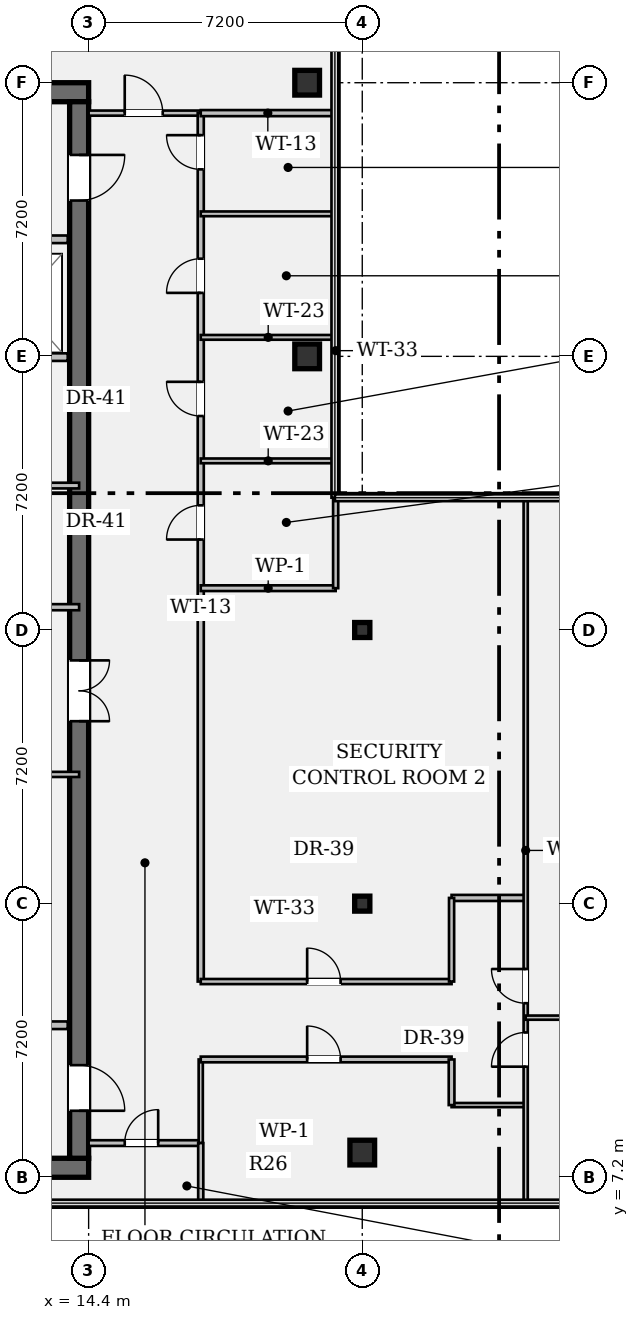
"""IFC4 building model, lengths in metres.
Left out: names, types, materials, properties, quantities, classifications, styles, units other than length and angle.
Written with IfcOpenShell. Run it as: python <this file> out.ifc"""

import sys

from ifc_helpers import new_model, si_unit, direction, frame, frame_2d, origin, origin_2d, place, context, subcontext, project, spatial, rectangle, hollow_rectangle, i_section, extrude, element, fill, save


model = new_model("IFC4")
c1 = context("Model", 3, precision=1e-05, world=origin(), true_north=direction((0.0, 1.0)))
c2 = subcontext(c1, "Body", "Model", "MODEL_VIEW")
j1 = project(units=[si_unit("LENGTHUNIT", "METRE"), si_unit("PLANEANGLEUNIT", "RADIAN")], contexts=[c1])
p1 = place(None, origin())
s1 = spatial("IfcSite", under=j1, at=p1, CompositionType="ELEMENT")
p2 = place(p1, origin())
s2 = spatial("IfcBuilding", under=s1, at=p2, CompositionType="ELEMENT")
p3 = place(p2, frame((0.0, 0.0, 241.15)))
s3 = spatial("IfcBuildingStorey", under=s2, at=p3, CompositionType="ELEMENT", Elevation=241.15)
for number, where, z_axis, x_axis in (
    (1, (0.5, 7.45, 0.0), (0.0, 0.0, 1.0), (1.0, 0.0, 0.0)),
    (2, (0.5, 35.75, 0.0), (0.0, 0.0, 1.0), (1.0, 0.0, 0.0)),
):
    element("IfcWall", number, at=place(p3, frame(where, z_axis=z_axis, x_axis=x_axis)), inside=s3, PredefinedType="SHEAR", context=c2, shape_type="SweptSolid", body=[
        extrude(rectangle(XDim=13.9, YDim=0.5, at=frame_2d((6.95, 0.0))), origin(), (0.0, 0.0, 1.0), 3.24),
    ])
p4 = place(p3, frame((14.15, 35.5, 0.0), z_axis=(0.0, 0.0, 1.0), x_axis=(0.0, -1.0, 0.0)))
e3 = element("IfcWall", 3, at=p4, inside=s3, PredefinedType="SHEAR", context=c2, shape_type="SweptSolid", body=[
    extrude(rectangle(XDim=27.8, YDim=0.5, at=frame_2d((13.9, 0.0))), origin(), (0.0, 0.0, 1.0), 3.24),
])
p5 = place(p4, frame((1.4, 0.0, 0.0)))
e4 = element("IfcOpeningElement", 4, at=p5, cuts=e3, PredefinedType="OPENING", context=c2, shape_type="SweptSolid", body=[
    extrude(rectangle(XDim=1.2, YDim=2.15, at=frame_2d((0.6, 1.075))), frame((0.0, 0.262, 0.0), z_axis=(0.0, -1.0, 0.0), x_axis=(1.0, 0.0, 0.0)), (0.0, 0.0, 1.0), 0.524),
])
p6 = place(p4, frame((25.35, 0.0, 0.0)))
e5 = element("IfcOpeningElement", 5, at=p6, cuts=e3, PredefinedType="OPENING", context=c2, shape_type="SweptSolid", body=[
    extrude(rectangle(XDim=1.2, YDim=2.15, at=frame_2d((0.6, 1.075))), frame((0.0, 0.262, 0.0), z_axis=(0.0, -1.0, 0.0), x_axis=(1.0, 0.0, 0.0)), (0.0, 0.0, 1.0), 0.524),
])
p7 = place(p4, frame((14.7, 0.0, 0.0)))
e6 = element("IfcOpeningElement", 6, at=p7, cuts=e3, PredefinedType="OPENING", context=c2, shape_type="SweptSolid", body=[
    extrude(rectangle(XDim=1.6, YDim=2.2, at=frame_2d((0.8, 1.1))), frame((0.0, 0.262, 0.0), z_axis=(0.0, -1.0, 0.0), x_axis=(1.0, 0.0, 0.0)), (0.0, 0.0, 1.0), 0.524),
])
for number, where, z_axis, x_axis in (
    (7, (20.15, 28.8, 0.0), (0.0, 0.0, 1.0), (1.0, 0.0, 0.0)),
    (8, (20.15, 36.0, 0.0), (0.0, 0.0, 1.0), (1.0, 0.0, 0.0)),
    (9, (21.6, 7.85, 0.0), (0.0, 0.0, 1.0), (1.0, 0.0, 0.0)),
):
    element("IfcColumn", number, at=place(p3, frame(where, z_axis=z_axis, x_axis=x_axis)), inside=s3, PredefinedType="COLUMN", context=c2, shape_type="SweptSolid", body=[
        extrude(hollow_rectangle(XDim=0.65, YDim=0.65, WallThickness=0.04, at=origin_2d()), origin(), (0.0, 0.0, 1.0), 3.24),
    ])
for number, where, z_axis, x_axis in (
    (10, (21.6, 14.4, 0.0), (0.0, 0.0, 1.0), (1.0, 0.0, 0.0)),
    (11, (21.6, 21.6, 0.0), (0.0, 0.0, 1.0), (1.0, 0.0, 0.0)),
):
    element("IfcColumn", number, at=place(p3, frame(where, z_axis=z_axis, x_axis=x_axis)), inside=s3, PredefinedType="COLUMN", context=c2, shape_type="SweptSolid", body=[
        extrude(i_section(OverallWidth=0.399, OverallDepth=0.394, WebThickness=0.023, FlangeThickness=0.037, FilletRadius=0.018, at=origin_2d()), origin(), (0.0, 0.0, 1.0), 3.24),
    ])
p8 = place(p3, frame((8.7, 31.88, 0.0), z_axis=(0.0, 0.0, 1.0), x_axis=(1.0, 0.0, 0.0)))
e12 = element("IfcWall", 12, at=p8, inside=s3, PredefinedType="PARTITIONING", context=c2, shape_type="SweptSolid", body=[
    extrude(rectangle(XDim=5.15, YDim=0.2, at=frame_2d((2.575, 0.0))), origin(), (0.0, 0.0, 1.0), 3.24),
])
p9 = place(p8, frame((0.75, 0.0, 0.0)))
e13 = element("IfcOpeningElement", 13, at=p9, cuts=e12, PredefinedType="OPENING", context=c2, shape_type="SweptSolid", body=[
    extrude(rectangle(XDim=1.2, YDim=2.2, at=frame_2d((0.6, 1.1))), frame((0.0, 0.112, 0.0), z_axis=(0.0, -1.0, 0.0), x_axis=(1.0, 0.0, 0.0)), (0.0, 0.0, 1.0), 0.224),
])
p10 = place(p8, frame((3.25, 0.0, 0.0)))
e14 = element("IfcOpeningElement", 14, at=p10, cuts=e12, PredefinedType="OPENING", context=c2, shape_type="SweptSolid", body=[
    extrude(rectangle(XDim=1.2, YDim=2.2, at=frame_2d((0.6, 1.1))), frame((0.0, 0.112, 0.0), z_axis=(0.0, -1.0, 0.0), x_axis=(1.0, 0.0, 0.0)), (0.0, 0.0, 1.0), 0.224),
])
for number, where, z_axis, x_axis in (
    (15, (8.7, 11.2, 0.0), (0.0, 0.0, 1.0), (1.0, 0.0, 0.0)),
    (16, (8.7, 28.78, 0.0), (0.0, 0.0, 1.0), (1.0, 0.0, 0.0)),
):
    element("IfcWall", number, at=place(p3, frame(where, z_axis=z_axis, x_axis=x_axis)), inside=s3, PredefinedType="PARTITIONING", context=c2, shape_type="SweptSolid", body=[
        extrude(rectangle(XDim=5.15, YDim=0.2, at=frame_2d((2.575, 0.0))), origin(), (0.0, 0.0, 1.0), 3.24),
    ])
p11 = place(p3, frame((7.1, 22.2, 0.0), z_axis=(0.0, 0.0, 1.0), x_axis=(1.0, 0.0, 0.0)))
e17 = element("IfcWall", 17, at=p11, inside=s3, PredefinedType="PARTITIONING", context=c2, shape_type="SweptSolid", body=[
    extrude(rectangle(XDim=7.05, YDim=0.16, at=frame_2d((3.525, 0.0))), origin(), (0.0, 0.0, 1.0), 3.24),
])
p12 = place(p3, frame((7.1, 25.4, 0.0), z_axis=(0.0, 0.0, 1.0), x_axis=(1.0, 0.0, 0.0)))
e18 = element("IfcWall", 18, at=p12, inside=s3, PredefinedType="PARTITIONING", context=c2, shape_type="SweptSolid", body=[
    extrude(rectangle(XDim=7.05, YDim=0.15, at=frame_2d((3.525, 0.0))), origin(), (0.0, 0.0, 1.0), 3.24),
])
p13 = place(p3, frame((5.15, 17.8, 0.0), z_axis=(0.0, 0.0, 1.0), x_axis=(1.0, 0.0, 0.0)))
e19 = element("IfcWall", 19, at=p13, inside=s3, PredefinedType="PARTITIONING", context=c2, shape_type="SweptSolid", body=[
    extrude(rectangle(XDim=9.0, YDim=0.135, at=frame_2d((4.5, 0.0))), origin(), (0.0, 0.0, 1.0), 3.24),
])
p14 = place(p13, frame((4.35, 0.0, 0.0)))
e20 = element("IfcOpeningElement", 20, at=p14, cuts=e19, PredefinedType="OPENING", context=c2, shape_type="SweptSolid", body=[
    extrude(rectangle(XDim=1.0, YDim=2.15, at=frame_2d((0.5, 1.075))), frame((0.0, 0.08, 0.0), z_axis=(0.0, -1.0, 0.0), x_axis=(1.0, 0.0, 0.0)), (0.0, 0.0, 1.0), 0.159),
])
p15 = place(p3, frame((14.4, 8.1, 0.0), z_axis=(0.0, 0.0, 1.0), x_axis=(1.0, 0.0, 0.0)))
e21 = element("IfcWall", 21, at=p15, inside=s3, PredefinedType="PARTITIONING", context=c2, shape_type="SweptSolid", body=[
    extrude(rectangle(XDim=2.95, YDim=0.15, at=frame_2d((1.475, 0.0))), origin(), (0.0, 0.0, 1.0), 3.24),
])
p16 = place(p15, frame((0.95, 0.0, 0.0)))
e22 = element("IfcOpeningElement", 22, at=p16, cuts=e21, PredefinedType="OPENING", context=c2, shape_type="SweptSolid", body=[
    extrude(rectangle(XDim=0.88, YDim=2.15, at=frame_2d((0.44, 1.075))), frame((0.0, 0.087, 0.0), z_axis=(0.0, -1.0, 0.0), x_axis=(1.0, 0.0, 0.0)), (0.0, 0.0, 1.0), 0.174),
])
p17 = place(p3, frame((14.4, 35.2, 0.0), z_axis=(0.0, 0.0, 1.0), x_axis=(1.0, 0.0, 0.0)))
e23 = element("IfcWall", 23, at=p17, inside=s3, PredefinedType="PARTITIONING", context=c2, shape_type="SweptSolid", body=[
    extrude(rectangle(XDim=2.95, YDim=0.135, at=frame_2d((1.475, 0.0))), origin(), (0.0, 0.0, 1.0), 2.808),
])
p18 = place(p17, frame((0.95, 0.0, 0.0)))
e24 = element("IfcOpeningElement", 24, at=p18, cuts=e23, PredefinedType="OPENING", context=c2, shape_type="SweptSolid", body=[
    extrude(rectangle(XDim=1.0, YDim=2.15, at=frame_2d((0.5, 1.075))), frame((0.0, 0.08, 0.0), z_axis=(0.0, -1.0, 0.0), x_axis=(1.0, 0.0, 0.0)), (0.0, 0.0, 1.0), 0.159),
])
p19 = place(p3, frame((17.35, 8.1, 0.0), z_axis=(0.0, 0.0, 1.0), x_axis=(0.0, 1.0, 0.0)))
e25 = element("IfcWall", 25, at=p19, inside=s3, PredefinedType="PARTITIONING", context=c2, shape_type="SweptSolid", body=[
    extrude(rectangle(XDim=2.2, YDim=0.11, at=frame_2d((1.1, 0.0))), origin(), (0.0, 0.0, 1.0), 3.24),
])
p20 = place(p3, frame((17.35, 12.35, 0.0), z_axis=(0.0, 0.0, 1.0), x_axis=(0.0, 1.0, 0.0)))
e26 = element("IfcWall", 26, at=p20, inside=s3, PredefinedType="PARTITIONING", context=c2, shape_type="SweptSolid", body=[
    extrude(rectangle(XDim=22.85, YDim=0.16, at=frame_2d((11.425, 0.0))), origin(), (0.0, 0.0, 1.0), 2.676),
])
p21 = place(p20, frame((11.63, 0.0, 0.0)))
e27 = element("IfcOpeningElement", 27, at=p21, cuts=e26, PredefinedType="OPENING", context=c2, shape_type="SweptSolid", body=[
    extrude(rectangle(XDim=0.9, YDim=2.15, at=frame_2d((0.45, 1.075))), frame((0.0, 0.092, 0.0), z_axis=(0.0, -1.0, 0.0), x_axis=(1.0, 0.0, 0.0)), (0.0, 0.0, 1.0), 0.184),
])
p22 = place(p20, frame((14.88, 0.0, 0.0)))
e28 = element("IfcOpeningElement", 28, at=p22, cuts=e26, PredefinedType="OPENING", context=c2, shape_type="SweptSolid", body=[
    extrude(rectangle(XDim=0.9, YDim=2.15, at=frame_2d((0.45, 1.075))), frame((0.0, 0.092, 0.0), z_axis=(0.0, -1.0, 0.0), x_axis=(1.0, 0.0, 0.0)), (0.0, 0.0, 1.0), 0.184),
])
p23 = place(p20, frame((18.12, 0.0, 0.0)))
e29 = element("IfcOpeningElement", 29, at=p23, cuts=e26, PredefinedType="OPENING", context=c2, shape_type="SweptSolid", body=[
    extrude(rectangle(XDim=0.9, YDim=2.15, at=frame_2d((0.45, 1.075))), frame((0.0, 0.092, 0.0), z_axis=(0.0, -1.0, 0.0), x_axis=(1.0, 0.0, 0.0)), (0.0, 0.0, 1.0), 0.184),
])
p24 = place(p20, frame((21.37, 0.0, 0.0)))
e30 = element("IfcOpeningElement", 30, at=p24, cuts=e26, PredefinedType="OPENING", context=c2, shape_type="SweptSolid", body=[
    extrude(rectangle(XDim=0.9, YDim=2.15, at=frame_2d((0.45, 1.075))), frame((0.0, 0.092, 0.0), z_axis=(0.0, -1.0, 0.0), x_axis=(1.0, 0.0, 0.0)), (0.0, 0.0, 1.0), 0.184),
])
p25 = place(p3, frame((17.35, 10.3, 0.0), z_axis=(0.0, 0.0, 1.0), x_axis=(1.0, 0.0, 0.0)))
e31 = element("IfcWall", 31, at=p25, inside=s3, PredefinedType="PARTITIONING", context=c2, shape_type="SweptSolid", body=[
    extrude(rectangle(XDim=6.6, YDim=0.15, at=frame_2d((3.3, 0.0))), origin(), (0.0, 0.0, 1.0), 2.676),
])
p26 = place(p25, frame((2.8, 0.0, 0.0)))
e32 = element("IfcOpeningElement", 32, at=p26, cuts=e31, PredefinedType="OPENING", context=c2, shape_type="SweptSolid", body=[
    extrude(rectangle(XDim=0.88, YDim=2.15, at=frame_2d((0.44, 1.075))), frame((0.0, 0.087, 0.0), z_axis=(0.0, -1.0, 0.0), x_axis=(1.0, 0.0, 0.0)), (0.0, 0.0, 1.0), 0.174),
])
p27 = place(p3, frame((17.35, 12.35, 0.0), z_axis=(0.0, 0.0, 1.0), x_axis=(1.0, 0.0, 0.0)))
e33 = element("IfcWall", 33, at=p27, inside=s3, PredefinedType="PARTITIONING", context=c2, shape_type="SweptSolid", body=[
    extrude(rectangle(XDim=6.6, YDim=0.135, at=frame_2d((3.3, 0.0))), origin(), (0.0, 0.0, 1.0), 2.676),
])
p28 = place(p27, frame((2.8, 0.0, 0.0)))
e34 = element("IfcOpeningElement", 34, at=p28, cuts=e33, PredefinedType="OPENING", context=c2, shape_type="SweptSolid", body=[
    extrude(rectangle(XDim=0.88, YDim=2.15, at=frame_2d((0.44, 1.075))), frame((0.0, 0.08, 0.0), z_axis=(0.0, -1.0, 0.0), x_axis=(1.0, 0.0, 0.0)), (0.0, 0.0, 1.0), 0.159),
])
p29 = place(p3, frame((23.95, 9.1, 0.0), z_axis=(0.0, 0.0, 1.0), x_axis=(1.0, 0.0, 0.0)))
e35 = element("IfcWall", 35, at=p29, inside=s3, PredefinedType="PARTITIONING", context=c2, shape_type="SweptSolid", body=[
    extrude(rectangle(XDim=1.95, YDim=0.11, at=frame_2d((0.975, 0.0))), origin(), (0.0, 0.0, 1.0), 3.24),
])
p30 = place(p3, frame((23.95, 14.55, 0.0), z_axis=(0.0, 0.0, 1.0), x_axis=(1.0, 0.0, 0.0)))
e36 = element("IfcWall", 36, at=p30, inside=s3, PredefinedType="PARTITIONING", context=c2, shape_type="SweptSolid", body=[
    extrude(rectangle(XDim=1.95, YDim=0.16, at=frame_2d((0.975, 0.0))), origin(), (0.0, 0.0, 1.0), 2.676),
])
p31 = place(p3, frame((23.95, 9.1, 0.0), z_axis=(0.0, 0.0, 1.0), x_axis=(0.0, 1.0, 0.0)))
e37 = element("IfcWall", 37, at=p31, inside=s3, PredefinedType="PARTITIONING", context=c2, shape_type="SweptSolid", body=[
    extrude(rectangle(XDim=1.2, YDim=0.15, at=frame_2d((0.6, 0.0))), origin(), (0.0, 0.0, 1.0), 2.808),
])
p32 = place(p3, frame((23.95, 12.35, 0.0), z_axis=(0.0, 0.0, 1.0), x_axis=(0.0, 1.0, 0.0)))
e38 = element("IfcWall", 38, at=p32, inside=s3, PredefinedType="PARTITIONING", context=c2, shape_type="SweptSolid", body=[
    extrude(rectangle(XDim=2.2, YDim=0.135, at=frame_2d((1.1, 0.0))), origin(), (0.0, 0.0, 1.0), 2.676),
])
p33 = place(p3, frame((25.9, 6.52, 0.0), z_axis=(0.0, 0.0, 1.0), x_axis=(0.0, 1.0, 0.0)))
e39 = element("IfcWall", 39, at=p33, inside=s3, PredefinedType="PARTITIONING", context=c2, shape_type="SweptSolid", body=[
    extrude(rectangle(XDim=18.56, YDim=0.11, at=frame_2d((9.28, 0.0))), origin(), (0.0, 0.0, 1.0), 2.676),
])
p34 = place(p33, frame((3.59, 0.0, 0.0)))
e40 = element("IfcOpeningElement", 40, at=p34, cuts=e39, PredefinedType="OPENING", context=c2, shape_type="SweptSolid", body=[
    extrude(rectangle(XDim=0.9, YDim=2.15, at=frame_2d((0.45, 1.075))), frame((0.0, 0.067, 0.0), z_axis=(0.0, -1.0, 0.0), x_axis=(1.0, 0.0, 0.0)), (0.0, 0.0, 1.0), 0.134),
])
p35 = place(p33, frame((5.26, 0.0, 0.0)))
e41 = element("IfcOpeningElement", 41, at=p35, cuts=e39, PredefinedType="OPENING", context=c2, shape_type="SweptSolid", body=[
    extrude(rectangle(XDim=0.9, YDim=2.15, at=frame_2d((0.45, 1.075))), frame((0.0, 0.067, 0.0), z_axis=(0.0, -1.0, 0.0), x_axis=(1.0, 0.0, 0.0)), (0.0, 0.0, 1.0), 0.134),
])
p36 = place(p3, frame((17.35, 35.2, 0.0), z_axis=(0.0, 0.0, 1.0), x_axis=(1.0, 0.0, 0.0)))
e42 = element("IfcWall", 42, at=p36, inside=s3, PredefinedType="PARTITIONING", context=c2, shape_type="SweptSolid", body=[
    extrude(rectangle(XDim=3.53, YDim=0.16, at=frame_2d((1.765, 0.0))), origin(), (0.0, 0.0, 1.0), 2.808),
])
p37 = place(p3, frame((17.35, 22.7, 0.0), z_axis=(0.0, 0.0, 1.0), x_axis=(1.0, 0.0, 0.0)))
e43 = element("IfcWall", 43, at=p37, inside=s3, PredefinedType="PARTITIONING", context=c2, shape_type="SweptSolid", body=[
    extrude(rectangle(XDim=3.55, YDim=0.15, at=frame_2d((1.775, 0.0))), origin(), (0.0, 0.0, 1.0), 2.808),
])
p38 = place(p3, frame((20.9, 22.7, 0.0), z_axis=(0.0, 0.0, 1.0), x_axis=(0.0, 1.0, 0.0)))
e44 = element("IfcWall", 44, at=p38, inside=s3, PredefinedType="PARTITIONING", context=c2, shape_type="SweptSolid", body=[
    extrude(rectangle(XDim=12.5, YDim=0.135, at=frame_2d((6.25, 0.0))), origin(), (0.0, 0.0, 1.0), 3.24),
])
for number, where, z_axis, x_axis in (
    (45, (17.35, 26.05, 0.0), (0.0, 0.0, 1.0), (1.0, 0.0, 0.0)),
    (46, (17.35, 29.3, 0.0), (0.0, 0.0, 1.0), (1.0, 0.0, 0.0)),
    (47, (17.35, 32.55, 0.0), (0.0, 0.0, 1.0), (1.0, 0.0, 0.0)),
):
    element("IfcWall", number, at=place(p3, frame(where, z_axis=z_axis, x_axis=x_axis)), inside=s3, PredefinedType="PARTITIONING", context=c2, shape_type="SweptSolid", body=[
        extrude(rectangle(XDim=3.55, YDim=0.125, at=frame_2d((1.775, 0.0))), origin(), (0.0, 0.0, 1.0), 2.808),
    ])
p39 = place(p3, frame((17.35, 6.52, 0.0), z_axis=(0.0, 0.0, 1.0), x_axis=(0.0, 1.0, 0.0)))
e48 = element("IfcWall", 48, at=p39, inside=s3, PredefinedType="PARTITIONING", context=c2, shape_type="SweptSolid", body=[
    extrude(rectangle(XDim=1.58, YDim=0.135, at=frame_2d((0.79, 0.0))), origin(), (0.0, 0.0, 1.0), 3.24),
])
p40 = place(p3, frame((25.9, 11.4, 0.0), z_axis=(0.0, 0.0, 1.0), x_axis=(1.0, 0.0, 0.0)))
e49 = element("IfcWall", 49, at=p40, inside=s3, PredefinedType="PARTITIONING", context=c2, shape_type="SweptSolid", body=[
    extrude(rectangle(XDim=19.58, YDim=0.11, at=frame_2d((9.79, 0.0))), origin(), (0.0, 0.0, 1.0), 2.676),
])
p41 = place(p5, origin())
e50 = element("IfcDoor", 50, at=p41, inside=s3, OperationType="SINGLE_SWING_LEFT", PredefinedType="DOOR", context=c2, shape_type="SweptSolid", body=[
    extrude(rectangle(XDim=1.2, YDim=2.15, at=frame_2d((0.6, 1.075))), frame((0.0, 0.025, 0.0), z_axis=(0.0, -1.0, 0.0), x_axis=(1.0, 0.0, 0.0)), (0.0, 0.0, 1.0), 0.05),
])
fill(e4, e50)
p42 = place(p6, origin())
e51 = element("IfcDoor", 51, at=p42, inside=s3, OperationType="SINGLE_SWING_RIGHT", PredefinedType="DOOR", context=c2, shape_type="SweptSolid", body=[
    extrude(rectangle(XDim=1.2, YDim=2.15, at=frame_2d((0.6, 1.075))), frame((0.0, 0.025, 0.0), z_axis=(0.0, -1.0, 0.0), x_axis=(1.0, 0.0, 0.0)), (0.0, 0.0, 1.0), 0.05),
])
fill(e5, e51)
p43 = place(p7, origin())
e52 = element("IfcDoor", 52, at=p43, inside=s3, OperationType="DOUBLE_DOOR_SINGLE_SWING", PredefinedType="DOOR", context=c2, shape_type="SweptSolid", body=[
    extrude(rectangle(XDim=1.6, YDim=2.2, at=frame_2d((0.8, 1.1))), frame((0.0, 0.025, 0.0), z_axis=(0.0, -1.0, 0.0), x_axis=(1.0, 0.0, 0.0)), (0.0, 0.0, 1.0), 0.05),
])
fill(e6, e52)
p44 = place(p18, origin())
e53 = element("IfcDoor", 53, at=p44, inside=s3, OperationType="SINGLE_SWING_LEFT", PredefinedType="DOOR", context=c2, shape_type="SweptSolid", body=[
    extrude(rectangle(XDim=1.0, YDim=2.15, at=frame_2d((0.5, 1.075))), frame((0.0, 0.025, 0.0), z_axis=(0.0, -1.0, 0.0), x_axis=(1.0, 0.0, 0.0)), (0.0, 0.0, 1.0), 0.05),
])
fill(e24, e53)
p45 = place(p21, origin())
e54 = element("IfcDoor", 54, at=p45, inside=s3, OperationType="SINGLE_SWING_LEFT", PredefinedType="DOOR", context=c2, shape_type="SweptSolid", body=[
    extrude(rectangle(XDim=0.9, YDim=2.15, at=frame_2d((0.45, 1.075))), frame((0.0, 0.025, 0.0), z_axis=(0.0, -1.0, 0.0), x_axis=(1.0, 0.0, 0.0)), (0.0, 0.0, 1.0), 0.05),
])
fill(e27, e54)
p46 = place(p22, origin())
e55 = element("IfcDoor", 55, at=p46, inside=s3, OperationType="SINGLE_SWING_RIGHT", PredefinedType="DOOR", context=c2, shape_type="SweptSolid", body=[
    extrude(rectangle(XDim=0.9, YDim=2.15, at=frame_2d((0.45, 1.075))), frame((0.0, 0.025, 0.0), z_axis=(0.0, -1.0, 0.0), x_axis=(1.0, 0.0, 0.0)), (0.0, 0.0, 1.0), 0.05),
])
fill(e28, e55)
p47 = place(p23, origin())
e56 = element("IfcDoor", 56, at=p47, inside=s3, OperationType="SINGLE_SWING_LEFT", PredefinedType="DOOR", context=c2, shape_type="SweptSolid", body=[
    extrude(rectangle(XDim=0.9, YDim=2.15, at=frame_2d((0.45, 1.075))), frame((0.0, 0.025, 0.0), z_axis=(0.0, -1.0, 0.0), x_axis=(1.0, 0.0, 0.0)), (0.0, 0.0, 1.0), 0.05),
])
fill(e29, e56)
p48 = place(p24, origin())
e57 = element("IfcDoor", 57, at=p48, inside=s3, OperationType="SINGLE_SWING_RIGHT", PredefinedType="DOOR", context=c2, shape_type="SweptSolid", body=[
    extrude(rectangle(XDim=0.9, YDim=2.15, at=frame_2d((0.45, 1.075))), frame((0.0, 0.025, 0.0), z_axis=(0.0, -1.0, 0.0), x_axis=(1.0, 0.0, 0.0)), (0.0, 0.0, 1.0), 0.05),
])
fill(e30, e57)
p49 = place(p28, origin())
e58 = element("IfcDoor", 58, at=p49, inside=s3, OperationType="SINGLE_SWING_LEFT", PredefinedType="DOOR", context=c2, shape_type="SweptSolid", body=[
    extrude(rectangle(XDim=0.88, YDim=2.15, at=frame_2d((0.44, 1.075))), frame((0.0, 0.025, 0.0), z_axis=(0.0, -1.0, 0.0), x_axis=(1.0, 0.0, 0.0)), (0.0, 0.0, 1.0), 0.05),
])
fill(e34, e58)
p50 = place(p16, origin())
e59 = element("IfcDoor", 59, at=p50, inside=s3, OperationType="SINGLE_SWING_RIGHT", PredefinedType="DOOR", context=c2, shape_type="SweptSolid", body=[
    extrude(rectangle(XDim=0.88, YDim=2.15, at=frame_2d((0.44, 1.075))), frame((0.0, 0.025, 0.0), z_axis=(0.0, -1.0, 0.0), x_axis=(1.0, 0.0, 0.0)), (0.0, 0.0, 1.0), 0.05),
])
fill(e22, e59)
p51 = place(p26, origin())
e60 = element("IfcDoor", 60, at=p51, inside=s3, OperationType="SINGLE_SWING_LEFT", PredefinedType="DOOR", context=c2, shape_type="SweptSolid", body=[
    extrude(rectangle(XDim=0.88, YDim=2.15, at=frame_2d((0.44, 1.075))), frame((0.0, 0.025, 0.0), z_axis=(0.0, -1.0, 0.0), x_axis=(1.0, 0.0, 0.0)), (0.0, 0.0, 1.0), 0.05),
])
fill(e32, e60)
p52 = place(p34, origin())
e61 = element("IfcDoor", 61, at=p52, inside=s3, OperationType="SINGLE_SWING_LEFT", PredefinedType="DOOR", context=c2, shape_type="SweptSolid", body=[
    extrude(rectangle(XDim=0.9, YDim=2.15, at=frame_2d((0.45, 1.075))), frame((0.0, 0.025, 0.0), z_axis=(0.0, -1.0, 0.0), x_axis=(1.0, 0.0, 0.0)), (0.0, 0.0, 1.0), 0.05),
])
fill(e40, e61)
p53 = place(p35, origin())
e62 = element("IfcDoor", 62, at=p53, inside=s3, OperationType="SINGLE_SWING_RIGHT", PredefinedType="DOOR", context=c2, shape_type="SweptSolid", body=[
    extrude(rectangle(XDim=0.9, YDim=2.15, at=frame_2d((0.45, 1.075))), frame((0.0, 0.025, 0.0), z_axis=(0.0, -1.0, 0.0), x_axis=(1.0, 0.0, 0.0)), (0.0, 0.0, 1.0), 0.05),
])
fill(e41, e62)
save(model, sys.argv[1])
